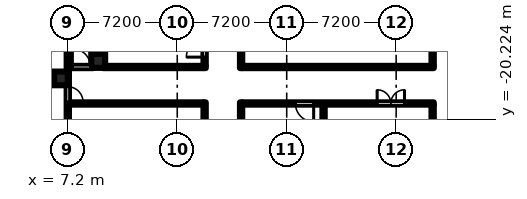
"""IFC4 building model, lengths in metres.
Left out: names, types, materials, properties, quantities, classifications, styles, units other than length and angle.
Written with IfcOpenShell. Run it as: python <this file> out.ifc"""

import sys

from ifc_helpers import new_model, si_unit, direction, frame, frame_2d, origin, origin_2d, place, context, subcontext, project, spatial, rectangle, hollow_circle, extrude, element, fill, save


model = new_model("IFC4")
c1 = context("Model", 3, precision=1e-05, world=origin(), true_north=direction((0.0, 1.0)))
c2 = subcontext(c1, "Body", "Model", "MODEL_VIEW")
j1 = project(units=[si_unit("LENGTHUNIT", "METRE"), si_unit("PLANEANGLEUNIT", "RADIAN")], contexts=[c1])
p1 = place(None, origin())
s1 = spatial("IfcSite", under=j1, at=p1, CompositionType="ELEMENT")
p2 = place(p1, origin())
s2 = spatial("IfcBuilding", under=s1, at=p2, CompositionType="ELEMENT")
p3 = place(p2, origin())
s3 = spatial("IfcBuildingStorey", under=s2, at=p3, CompositionType="ELEMENT", Elevation=0.0)
p4 = place(p3, frame((6.75, -17.55, 0.0), z_axis=(0.0, 0.0, 1.0), x_axis=(1.0, 0.0, 0.0)))
e1 = element("IfcColumn", 1, at=p4, inside=s3, PredefinedType="COLUMN", context=c2, shape_type="SweptSolid", body=[
    extrude(rectangle(XDim=0.9, YDim=0.9, at=origin_2d()), origin(), (0.0, 0.0, 1.0), 7.2),
])
p5 = place(p3, frame((9.2, -16.4, 0.0), z_axis=(0.0, 0.0, 1.0), x_axis=(1.0, 0.0, 0.0)))
e2 = element("IfcColumn", 2, at=p5, inside=s3, PredefinedType="COLUMN", context=c2, shape_type="SweptSolid", body=[
    extrude(hollow_circle(Radius=0.457, WallThickness=0.05, at=origin_2d()), origin(), (0.0, 0.0, 1.0), 7.5),
])
p6 = place(p3, frame((7.2, -31.125, 0.0), z_axis=(0.0, 0.0, 1.0), x_axis=(0.0, 1.0, 0.0)))
e3 = element("IfcWall", 3, at=p6, inside=s3, PredefinedType="PARTITIONING", context=c2, shape_type="SweptSolid", body=[
    extrude(rectangle(XDim=16.725, YDim=0.15, at=frame_2d((8.363, 0.0))), origin(), (0.0, 0.0, 1.0), 6.3),
])
p7 = place(p6, frame((12.025, 0.0, 0.0)))
e4 = element("IfcOpeningElement", 4, at=p7, cuts=e3, PredefinedType="OPENING", context=c2, shape_type="SweptSolid", body=[
    extrude(rectangle(XDim=1.0, YDim=2.1, at=frame_2d((0.5, 1.05))), frame((0.0, 0.085, 0.0), z_axis=(0.0, -1.0, 0.0), x_axis=(1.0, 0.0, 0.0)), (0.0, 0.0, 1.0), 0.17),
])
p8 = place(p6, frame((7.075, 0.0, 0.0)))
e5 = element("IfcOpeningElement", 5, at=p8, cuts=e3, PredefinedType="OPENING", context=c2, shape_type="SweptSolid", body=[
    extrude(rectangle(XDim=1.2, YDim=2.1, at=frame_2d((0.6, 1.05))), frame((0.0, 0.085, 0.0), z_axis=(0.0, -1.0, 0.0), x_axis=(1.0, 0.0, 0.0)), (0.0, 0.0, 1.0), 0.17),
])
p9 = place(p3, frame((7.275, -19.2, 0.0), z_axis=(0.0, 0.0, 1.0), x_axis=(1.0, 0.0, 0.0)))
e6 = element("IfcWall", 6, at=p9, inside=s3, PredefinedType="PARTITIONING", context=c2, shape_type="SweptSolid", body=[
    extrude(rectangle(XDim=8.85, YDim=0.15, at=frame_2d((4.425, 0.0))), origin(), (0.0, 0.0, 1.0), 6.6),
])
p10 = place(p3, frame((7.275, -16.8, 0.0), z_axis=(0.0, 0.0, 1.0), x_axis=(1.0, 0.0, 0.0)))
e7 = element("IfcWall", 7, at=p10, inside=s3, PredefinedType="PARTITIONING", context=c2, shape_type="SweptSolid", body=[
    extrude(rectangle(XDim=1.604, YDim=0.15, at=frame_2d((0.802, 0.0))), origin(), (0.0, 0.0, 1.0), 6.6),
])
p11 = place(p10, frame((0.225, 0.0, 0.0)))
e8 = element("IfcOpeningElement", 8, at=p11, cuts=e7, PredefinedType="OPENING", context=c2, shape_type="SweptSolid", body=[
    extrude(rectangle(XDim=1.2, YDim=2.1, at=frame_2d((0.6, 1.05))), frame((0.0, 0.085, 0.0), z_axis=(0.0, -1.0, 0.0), x_axis=(1.0, 0.0, 0.0)), (0.0, 0.0, 1.0), 0.17),
])
p12 = place(p3, frame((9.521, -16.8, 0.0), z_axis=(0.0, 0.0, 1.0), x_axis=(1.0, 0.0, 0.0)))
e9 = element("IfcWall", 9, at=p12, inside=s3, PredefinedType="PARTITIONING", context=c2, shape_type="SweptSolid", body=[
    extrude(rectangle(XDim=6.753, YDim=0.15, at=frame_2d((3.377, 0.0))), origin(), (0.0, 0.0, 1.0), 6.6),
])
p13 = place(p3, frame((16.2, -31.275, 0.0), z_axis=(0.0, 0.0, 1.0), x_axis=(0.0, 1.0, 0.0)))
e10 = element("IfcWall", 10, at=p13, inside=s3, PredefinedType="PARTITIONING", context=c2, shape_type="SweptSolid", body=[
    extrude(rectangle(XDim=12.15, YDim=0.15, at=frame_2d((6.075, 0.0))), origin(), (0.0, 0.0, 1.0), 6.6),
])
p14 = place(p13, frame((0.725, 0.0, 0.0)))
e11 = element("IfcOpeningElement", 11, at=p14, cuts=e10, PredefinedType="OPENING", context=c2, shape_type="SweptSolid", body=[
    extrude(rectangle(XDim=1.8, YDim=2.1, at=frame_2d((0.9, 1.05))), frame((0.0, 0.085, 0.0), z_axis=(0.0, -1.0, 0.0), x_axis=(1.0, 0.0, 0.0)), (0.0, 0.0, 1.0), 0.17),
])
p15 = place(p13, frame((7.061, 0.0, 0.0)))
e12 = element("IfcOpeningElement", 12, at=p15, cuts=e10, PredefinedType="OPENING", context=c2, shape_type="SweptSolid", body=[
    extrude(rectangle(XDim=1.2, YDim=2.1, at=frame_2d((0.6, 1.05))), frame((0.0, 0.085, 0.0), z_axis=(0.0, -1.0, 0.0), x_axis=(1.0, 0.0, 0.0)), (0.0, 0.0, 1.0), 0.17),
])
p16 = place(p3, frame((16.2, -16.725, 0.0), z_axis=(0.0, 0.0, 1.0), x_axis=(0.0, 1.0, 0.0)))
e13 = element("IfcWall", 13, at=p16, inside=s3, PredefinedType="PARTITIONING", context=c2, shape_type="SweptSolid", body=[
    extrude(rectangle(XDim=6.4, YDim=0.15, at=frame_2d((3.2, 0.0))), origin(), (0.0, 0.0, 1.0), 6.6),
])
p17 = place(p16, frame((0.575, 0.0, 0.0)))
e14 = element("IfcOpeningElement", 14, at=p17, cuts=e13, PredefinedType="OPENING", context=c2, shape_type="SweptSolid", body=[
    extrude(rectangle(XDim=1.2, YDim=2.1, at=frame_2d((0.6, 1.05))), frame((0.0, 0.085, 0.0), z_axis=(0.0, -1.0, 0.0), x_axis=(1.0, 0.0, 0.0)), (0.0, 0.0, 1.0), 0.17),
])
p18 = place(p16, frame((4.925, 0.0, 0.0)))
e15 = element("IfcOpeningElement", 15, at=p18, cuts=e13, PredefinedType="OPENING", context=c2, shape_type="SweptSolid", body=[
    extrude(rectangle(XDim=0.9, YDim=2.1, at=frame_2d((0.45, 1.05))), frame((0.0, 0.085, 0.0), z_axis=(0.0, -1.0, 0.0), x_axis=(1.0, 0.0, 0.0)), (0.0, 0.0, 1.0), 0.17),
])
p19 = place(p3, frame((18.6, -31.275, 0.0), z_axis=(0.0, 0.0, 1.0), x_axis=(0.0, 1.0, 0.0)))
e16 = element("IfcWall", 16, at=p19, inside=s3, PredefinedType="PARTITIONING", context=c2, shape_type="SweptSolid", body=[
    extrude(rectangle(XDim=12.15, YDim=0.15, at=frame_2d((6.075, 0.0))), origin(), (0.0, 0.0, 1.0), 6.6),
])
p20 = place(p3, frame((18.675, -19.2, 0.0), z_axis=(0.0, 0.0, 1.0), x_axis=(1.0, 0.0, 0.0)))
e17 = element("IfcWall", 17, at=p20, inside=s3, PredefinedType="PARTITIONING", context=c2, shape_type="SweptSolid", body=[
    extrude(rectangle(XDim=12.6, YDim=0.15, at=frame_2d((6.3, 0.0))), origin(), (0.0, 0.0, 1.0), 6.6),
])
p21 = place(p20, frame((3.499, 0.0, 0.0)))
e18 = element("IfcOpeningElement", 18, at=p21, cuts=e17, PredefinedType="OPENING", context=c2, shape_type="SweptSolid", body=[
    extrude(rectangle(XDim=1.2, YDim=2.1, at=frame_2d((0.6, 1.05))), frame((0.0, 0.085, 0.0), z_axis=(0.0, -1.0, 0.0), x_axis=(1.0, 0.0, 0.0)), (0.0, 0.0, 1.0), 0.17),
])
p22 = place(p20, frame((8.875, 0.0, 0.0)))
e19 = element("IfcOpeningElement", 19, at=p22, cuts=e17, PredefinedType="OPENING", context=c2, shape_type="SweptSolid", body=[
    extrude(rectangle(XDim=1.8, YDim=2.1, at=frame_2d((0.9, 1.05))), frame((0.0, 0.085, 0.0), z_axis=(0.0, -1.0, 0.0), x_axis=(1.0, 0.0, 0.0)), (0.0, 0.0, 1.0), 0.17),
])
p23 = place(p3, frame((18.6, -16.875, 0.0), z_axis=(0.0, 0.0, 1.0), x_axis=(0.0, 1.0, 0.0)))
e20 = element("IfcWall", 20, at=p23, inside=s3, PredefinedType="PARTITIONING", context=c2, shape_type="SweptSolid", body=[
    extrude(rectangle(XDim=6.55, YDim=0.15, at=frame_2d((3.275, 0.0))), origin(), (0.0, 0.0, 1.0), 6.6),
])
p24 = place(p23, frame((1.325, 0.0, 0.0)))
e21 = element("IfcOpeningElement", 21, at=p24, cuts=e20, PredefinedType="OPENING", context=c2, shape_type="SweptSolid", body=[
    extrude(rectangle(XDim=1.8, YDim=2.1, at=frame_2d((0.9, 1.05))), frame((0.0, 0.085, 0.0), z_axis=(0.0, -1.0, 0.0), x_axis=(1.0, 0.0, 0.0)), (0.0, 0.0, 1.0), 0.17),
])
p25 = place(p3, frame((18.675, -16.8, 0.0), z_axis=(0.0, 0.0, 1.0), x_axis=(1.0, 0.0, 0.0)))
e22 = element("IfcWall", 22, at=p25, inside=s3, PredefinedType="PARTITIONING", context=c2, shape_type="SweptSolid", body=[
    extrude(rectangle(XDim=12.6, YDim=0.15, at=frame_2d((6.3, 0.0))), origin(), (0.0, 0.0, 1.0), 6.6),
])
for number, where, z_axis, x_axis in (
    (23, (24.024, -31.125, 0.0), (0.0, 0.0, 1.0), (0.0, 1.0, 0.0)),
    (24, (31.2, -31.125, 0.0), (0.0, 0.0, 1.0), (0.0, 1.0, 0.0)),
):
    element("IfcWall", number, at=place(p3, frame(where, z_axis=z_axis, x_axis=x_axis)), inside=s3, PredefinedType="PARTITIONING", context=c2, shape_type="SweptSolid", body=[
        extrude(rectangle(XDim=11.85, YDim=0.15, at=frame_2d((5.925, 0.0))), origin(), (0.0, 0.0, 1.0), 6.6),
    ])
p26 = place(p3, frame((31.2, -16.725, 0.0), z_axis=(0.0, 0.0, 1.0), x_axis=(0.0, 1.0, 0.0)))
e25 = element("IfcWall", 25, at=p26, inside=s3, PredefinedType="PARTITIONING", context=c2, shape_type="SweptSolid", body=[
    extrude(rectangle(XDim=6.4, YDim=0.15, at=frame_2d((3.2, 0.0))), origin(), (0.0, 0.0, 1.0), 6.6),
])
p27 = place(p26, frame((3.425, 0.0, 0.0)))
e26 = element("IfcOpeningElement", 26, at=p27, cuts=e25, PredefinedType="OPENING", context=c2, shape_type="SweptSolid", body=[
    extrude(rectangle(XDim=1.8, YDim=2.1, at=frame_2d((0.9, 1.05))), frame((0.0, 0.085, 0.0), z_axis=(0.0, -1.0, 0.0), x_axis=(1.0, 0.0, 0.0)), (0.0, 0.0, 1.0), 0.17),
])
p28 = place(p7, frame((1.0, 0.0, 0.0), z_axis=(0.0, 0.0, 1.0), x_axis=(-1.0, 0.0, 0.0)))
e27 = element("IfcDoor", 27, at=p28, inside=s3, OperationType="SINGLE_SWING_RIGHT", PredefinedType="DOOR", context=c2, shape_type="SweptSolid", body=[
    extrude(rectangle(XDim=1.0, YDim=2.1, at=frame_2d((0.5, 1.05))), frame((0.0, 0.025, 0.0), z_axis=(0.0, -1.0, 0.0), x_axis=(1.0, 0.0, 0.0)), (0.0, 0.0, 1.0), 0.05),
])
fill(e4, e27)
p29 = place(p11, origin())
e28 = element("IfcDoor", 28, at=p29, inside=s3, OperationType="SINGLE_SWING_LEFT", PredefinedType="DOOR", context=c2, shape_type="SweptSolid", body=[
    extrude(rectangle(XDim=1.2, YDim=2.1, at=frame_2d((0.6, 1.05))), frame((0.0, 0.025, 0.0), z_axis=(0.0, -1.0, 0.0), x_axis=(1.0, 0.0, 0.0)), (0.0, 0.0, 1.0), 0.05),
])
fill(e8, e28)
p30 = place(p17, origin())
e29 = element("IfcDoor", 29, at=p30, inside=s3, OperationType="SINGLE_SWING_LEFT", PredefinedType="DOOR", context=c2, shape_type="SweptSolid", body=[
    extrude(rectangle(XDim=1.2, YDim=2.1, at=frame_2d((0.6, 1.05))), frame((0.0, 0.025, 0.0), z_axis=(0.0, -1.0, 0.0), x_axis=(1.0, 0.0, 0.0)), (0.0, 0.0, 1.0), 0.05),
])
fill(e14, e29)
p31 = place(p21, frame((1.2, 0.0, 0.0), z_axis=(0.0, 0.0, 1.0), x_axis=(-1.0, 0.0, 0.0)))
e30 = element("IfcDoor", 30, at=p31, inside=s3, OperationType="SINGLE_SWING_LEFT", PredefinedType="DOOR", context=c2, shape_type="SweptSolid", body=[
    extrude(rectangle(XDim=1.2, YDim=2.1, at=frame_2d((0.6, 1.05))), frame((0.0, 0.025, 0.0), z_axis=(0.0, -1.0, 0.0), x_axis=(1.0, 0.0, 0.0)), (0.0, 0.0, 1.0), 0.05),
])
fill(e18, e30)
p32 = place(p22, origin())
e31 = element("IfcDoor", 31, at=p32, inside=s3, OperationType="DOUBLE_DOOR_DOUBLE_SWING", PredefinedType="DOOR", context=c2, shape_type="SweptSolid", body=[
    extrude(rectangle(XDim=1.8, YDim=2.1, at=frame_2d((0.9, 1.05))), frame((0.0, 0.025, 0.0), z_axis=(0.0, -1.0, 0.0), x_axis=(1.0, 0.0, 0.0)), (0.0, 0.0, 1.0), 0.05),
])
fill(e19, e31)
save(model, sys.argv[1])
